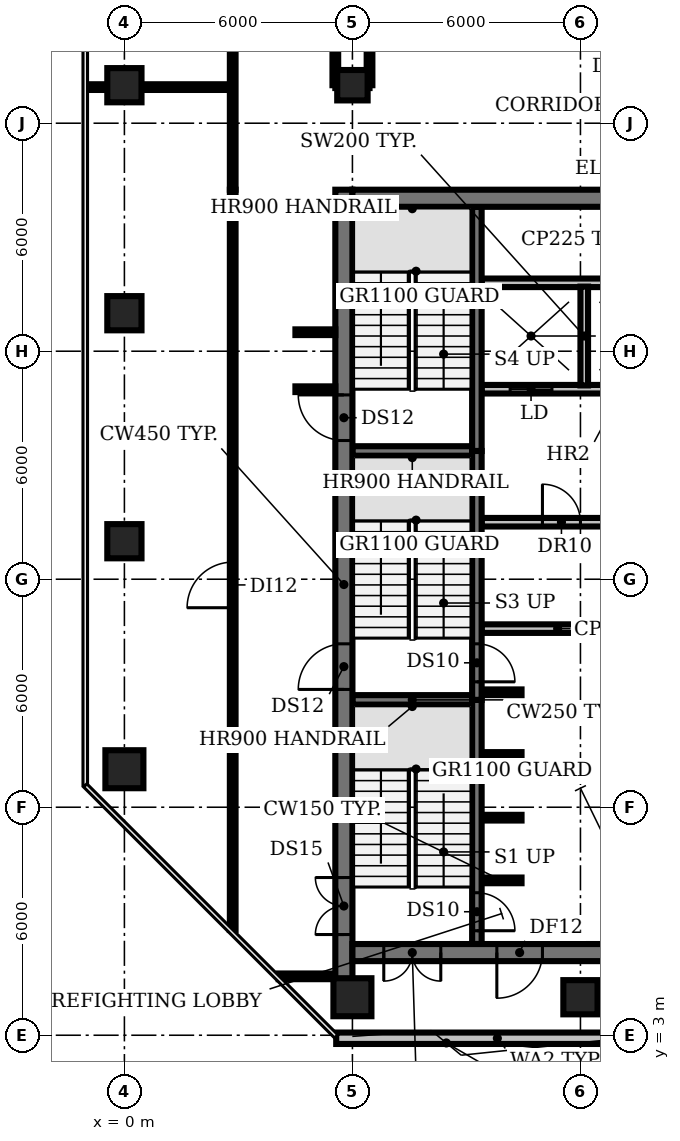
"""IFC4 building model, lengths in metres.
Left out: names, types, materials, properties, quantities, classifications, styles, units other than length and angle.
Written with IfcOpenShell. Run it as: python <this file> out.ifc"""

import sys

from ifc_helpers import new_model, si_unit, direction, frame, frame_2d, origin, origin_2d, place, context, subcontext, project, spatial, rectangle, circle, extrude, element, fill, save


model = new_model("IFC4")
c1 = context("Model", 3, precision=1e-05, world=origin(), true_north=direction((0.0, 1.0)))
c2 = subcontext(c1, "Body", "Model", "MODEL_VIEW")
j1 = project(units=[si_unit("LENGTHUNIT", "METRE"), si_unit("PLANEANGLEUNIT", "RADIAN")], contexts=[c1])
p1 = place(None, origin())
s1 = spatial("IfcSite", under=j1, at=p1, CompositionType="ELEMENT")
p2 = place(p1, origin())
s2 = spatial("IfcBuilding", under=s1, at=p2, CompositionType="ELEMENT")
p3 = place(p2, frame((0.0, 0.0, 205.4)))
s3 = spatial("IfcBuildingStorey", under=s2, at=p3, CompositionType="ELEMENT", Elevation=205.4)
p4 = place(p3, frame((0.0, 10.0, -0.35), z_axis=(0.0, 0.0, 1.0), x_axis=(1.0, 0.0, 0.0)))
e1 = element("IfcColumn", 1, at=p4, inside=s3, PredefinedType="COLUMN", context=c2, shape_type="SweptSolid", body=[
    extrude(circle(Radius=0.5, at=origin_2d()), origin(), (0.0, 0.0, 1.0), 4.2),
])
for number, where, z_axis, x_axis in (
    (2, (0.0, 16.0, -0.35), (0.0, 0.0, 1.0), (1.0, 0.0, 0.0)),
    (3, (0.0, 22.0, -0.35), (0.0, 0.0, 1.0), (1.0, 0.0, 0.0)),
    (4, (0.0, 28.0, -0.35), (0.0, 0.0, 1.0), (1.0, 0.0, 0.0)),
):
    element("IfcColumn", number, at=place(p3, frame(where, z_axis=z_axis, x_axis=x_axis)), inside=s3, PredefinedType="COLUMN", context=c2, shape_type="SweptSolid", body=[
        extrude(rectangle(XDim=0.9, YDim=0.9, at=origin_2d()), origin(), (0.0, 0.0, 1.0), 4.2),
    ])
p5 = place(p3, frame((6.0, 4.0, -0.35), z_axis=(0.0, 0.0, 1.0), x_axis=(1.0, 0.0, 0.0)))
e5 = element("IfcColumn", 5, at=p5, inside=s3, PredefinedType="COLUMN", context=c2, shape_type="SweptSolid", body=[
    extrude(circle(Radius=0.5, at=origin_2d()), origin(), (0.0, 0.0, 1.0), 4.2),
])
p6 = place(p3, frame((6.0, 28.0, -0.35), z_axis=(0.0, 0.0, 1.0), x_axis=(1.0, 0.0, 0.0)))
e6 = element("IfcColumn", 6, at=p6, inside=s3, PredefinedType="COLUMN", context=c2, shape_type="SweptSolid", body=[
    extrude(rectangle(XDim=0.8, YDim=0.8, at=origin_2d()), origin(), (0.0, 0.0, 1.0), 4.2),
])
p7 = place(p3, frame((12.0, 4.0, -0.35), z_axis=(0.0, 0.0, 1.0), x_axis=(1.0, 0.0, 0.0)))
e7 = element("IfcColumn", 7, at=p7, inside=s3, PredefinedType="COLUMN", context=c2, shape_type="SweptSolid", body=[
    extrude(rectangle(XDim=0.9, YDim=0.9, at=origin_2d()), origin(), (0.0, 0.0, 1.0), 4.2),
])
p8 = place(p3, frame((5.573, 2.92, 0.0), z_axis=(0.0, 0.0, 1.0), x_axis=(1.0, 0.0, 0.0)))
e8 = element("IfcWall", 8, at=p8, inside=s3, PredefinedType="SOLIDWALL", context=c2, shape_type="SweptSolid", body=[
    extrude(rectangle(XDim=8.48, YDim=0.3, at=frame_2d((4.24, 0.0))), origin(), (0.0, 0.0, 1.0), 3.85),
])
for number, where, z_axis, x_axis in (
    (9, (9.4, 7.075, 0.0), (0.0, 0.0, 1.0), (1.0, 0.0, 0.0)),
    (10, (9.4, 8.725, 0.0), (0.0, 0.0, 1.0), (1.0, 0.0, 0.0)),
    (11, (9.4, 10.375, 0.0), (0.0, 0.0, 1.0), (1.0, 0.0, 0.0)),
):
    element("IfcWall", number, at=place(p3, frame(where, z_axis=z_axis, x_axis=x_axis)), inside=s3, PredefinedType="SHEAR", context=c2, shape_type="SweptSolid", body=[
        extrude(rectangle(XDim=1.05, YDim=0.15, at=frame_2d((0.525, 0.0))), origin(), (0.0, 0.0, 1.0), 3.85),
    ])
p9 = place(p3, frame((6.0, 11.825, 0.0), z_axis=(0.0, 0.0, 1.0), x_axis=(1.0, 0.0, 0.0)))
e12 = element("IfcWall", 12, at=p9, inside=s3, PredefinedType="SHEAR", context=c2, shape_type="SweptSolid", body=[
    extrude(rectangle(XDim=3.15, YDim=0.25, at=frame_2d((1.575, 0.0))), origin(), (0.0, 0.0, 1.0), 3.85),
])
p10 = place(p3, frame((9.4, 12.025, 0.0), z_axis=(0.0, 0.0, 1.0), x_axis=(1.0, 0.0, 0.0)))
e13 = element("IfcWall", 13, at=p10, inside=s3, PredefinedType="SHEAR", context=c2, shape_type="SweptSolid", body=[
    extrude(rectangle(XDim=1.05, YDim=0.15, at=frame_2d((0.525, 0.0))), origin(), (0.0, 0.0, 1.0), 3.85),
])
p11 = place(p3, frame((9.4, 13.7, 0.0), z_axis=(0.0, 0.0, 1.0), x_axis=(1.0, 0.0, 0.0)))
e14 = element("IfcWall", 14, at=p11, inside=s3, PredefinedType="PARTITIONING", context=c2, shape_type="SweptSolid", body=[
    extrude(rectangle(XDim=4.0, YDim=0.225, at=frame_2d((2.0, 0.0))), origin(), (0.0, 0.0, 1.0), 3.85),
])
p12 = place(p3, frame((9.4, 16.5, 0.0), z_axis=(0.0, 0.0, 1.0), x_axis=(1.0, 0.0, 0.0)))
e15 = element("IfcWall", 15, at=p12, inside=s3, PredefinedType="PARTITIONING", context=c2, shape_type="SweptSolid", body=[
    extrude(rectangle(XDim=14.6, YDim=0.225, at=frame_2d((7.3, 0.0))), origin(), (0.0, 0.0, 1.0), 3.85),
])
p13 = place(p12, frame((1.6, 0.0, 0.0)))
e16 = element("IfcOpeningElement", 16, at=p13, cuts=e15, PredefinedType="OPENING", context=c2, shape_type="SweptSolid", body=[
    extrude(rectangle(XDim=1.0, YDim=2.1, at=frame_2d((0.5, 1.05))), frame((0.0, 0.123, 0.0), z_axis=(0.0, -1.0, 0.0), x_axis=(1.0, 0.0, 0.0)), (0.0, 0.0, 1.0), 0.245),
])
p14 = place(p12, frame((5.125, 0.0, 0.0)))
e17 = element("IfcOpeningElement", 17, at=p14, cuts=e15, PredefinedType="OPENING", context=c2, shape_type="SweptSolid", body=[
    extrude(rectangle(XDim=0.9, YDim=2.1, at=frame_2d((0.45, 1.05))), frame((0.0, 0.123, 0.0), z_axis=(0.0, -1.0, 0.0), x_axis=(1.0, 0.0, 0.0)), (0.0, 0.0, 1.0), 0.245),
])
p15 = place(p12, frame((7.675, 0.0, 0.0)))
e18 = element("IfcOpeningElement", 18, at=p15, cuts=e15, PredefinedType="OPENING", context=c2, shape_type="SweptSolid", body=[
    extrude(rectangle(XDim=0.9, YDim=2.1, at=frame_2d((0.45, 1.05))), frame((0.0, 0.123, 0.0), z_axis=(0.0, -1.0, 0.0), x_axis=(1.0, 0.0, 0.0)), (0.0, 0.0, 1.0), 0.245),
])
p16 = place(p12, frame((9.775, 0.0, 0.0)))
e19 = element("IfcOpeningElement", 19, at=p16, cuts=e15, PredefinedType="OPENING", context=c2, shape_type="SweptSolid", body=[
    extrude(rectangle(XDim=0.9, YDim=2.1, at=frame_2d((0.45, 1.05))), frame((0.0, 0.123, 0.0), z_axis=(0.0, -1.0, 0.0), x_axis=(1.0, 0.0, 0.0)), (0.0, 0.0, 1.0), 0.245),
])
p17 = place(p12, frame((11.647, 0.0, 0.0)))
e20 = element("IfcOpeningElement", 20, at=p17, cuts=e15, PredefinedType="OPENING", context=c2, shape_type="SweptSolid", body=[
    extrude(rectangle(XDim=0.9, YDim=2.1, at=frame_2d((0.45, 1.05))), frame((0.0, 0.123, 0.0), z_axis=(0.0, -1.0, 0.0), x_axis=(1.0, 0.0, 0.0)), (0.0, 0.0, 1.0), 0.245),
])
p18 = place(p12, frame((13.423, 0.0, 0.0)))
e21 = element("IfcOpeningElement", 21, at=p18, cuts=e15, PredefinedType="OPENING", context=c2, shape_type="SweptSolid", body=[
    extrude(rectangle(XDim=0.9, YDim=2.1, at=frame_2d((0.45, 1.05))), frame((0.0, 0.123, 0.0), z_axis=(0.0, -1.0, 0.0), x_axis=(1.0, 0.0, 0.0)), (0.0, 0.0, 1.0), 0.245),
])
p19 = place(p3, frame((6.0, 18.375, 0.0), z_axis=(0.0, 0.0, 1.0), x_axis=(1.0, 0.0, 0.0)))
e22 = element("IfcWall", 22, at=p19, inside=s3, PredefinedType="SHEAR", context=c2, shape_type="SweptSolid", body=[
    extrude(rectangle(XDim=3.15, YDim=0.25, at=frame_2d((1.575, 0.0))), origin(), (0.0, 0.0, 1.0), 3.85),
])
p20 = place(p3, frame((24.0, 20.0, 0.0), z_axis=(0.0, 0.0, 1.0), x_axis=(-1.0, 0.0, 0.0)))
e23 = element("IfcWall", 23, at=p20, inside=s3, PredefinedType="PARTITIONING", context=c2, shape_type="SweptSolid", body=[
    extrude(rectangle(XDim=14.6, YDim=0.225, at=frame_2d((7.3, 0.0))), origin(), (0.0, 0.0, 1.0), 3.85),
])
p21 = place(p20, frame((12.75, 0.0, 0.0)))
e24 = element("IfcOpeningElement", 24, at=p21, cuts=e23, PredefinedType="OPENING", context=c2, shape_type="SweptSolid", body=[
    extrude(rectangle(XDim=1.1, YDim=2.1, at=frame_2d((0.55, 1.05))), frame((0.0, 0.123, 0.0), z_axis=(0.0, -1.0, 0.0), x_axis=(1.0, 0.0, 0.0)), (0.0, 0.0, 1.0), 0.245),
])
p22 = place(p20, frame((9.95, 0.0, 0.0)))
e25 = element("IfcOpeningElement", 25, at=p22, cuts=e23, PredefinedType="OPENING", context=c2, shape_type="SweptSolid", body=[
    extrude(rectangle(XDim=1.1, YDim=2.1, at=frame_2d((0.55, 1.05))), frame((0.0, 0.123, 0.0), z_axis=(0.0, -1.0, 0.0), x_axis=(1.0, 0.0, 0.0)), (0.0, 0.0, 1.0), 0.245),
])
p23 = place(p20, frame((7.15, 0.0, 0.0)))
e26 = element("IfcOpeningElement", 26, at=p23, cuts=e23, PredefinedType="OPENING", context=c2, shape_type="SweptSolid", body=[
    extrude(rectangle(XDim=1.1, YDim=2.1, at=frame_2d((0.55, 1.05))), frame((0.0, 0.123, 0.0), z_axis=(0.0, -1.0, 0.0), x_axis=(1.0, 0.0, 0.0)), (0.0, 0.0, 1.0), 0.245),
])
p24 = place(p20, frame((4.35, 0.0, 0.0)))
e27 = element("IfcOpeningElement", 27, at=p24, cuts=e23, PredefinedType="OPENING", context=c2, shape_type="SweptSolid", body=[
    extrude(rectangle(XDim=1.1, YDim=2.1, at=frame_2d((0.55, 1.05))), frame((0.0, 0.123, 0.0), z_axis=(0.0, -1.0, 0.0), x_axis=(1.0, 0.0, 0.0)), (0.0, 0.0, 1.0), 0.245),
])
p25 = place(p20, frame((2.137, 0.0, 0.0)))
e28 = element("IfcOpeningElement", 28, at=p25, cuts=e23, PredefinedType="OPENING", context=c2, shape_type="SweptSolid", body=[
    extrude(rectangle(XDim=0.9, YDim=2.1, at=frame_2d((0.45, 1.05))), frame((0.0, 0.123, 0.0), z_axis=(0.0, -1.0, 0.0), x_axis=(1.0, 0.0, 0.0)), (0.0, 0.0, 1.0), 0.245),
])
p26 = place(p20, frame((0.363, 0.0, 0.0)))
e29 = element("IfcOpeningElement", 29, at=p26, cuts=e23, PredefinedType="OPENING", context=c2, shape_type="SweptSolid", body=[
    extrude(rectangle(XDim=0.9, YDim=2.1, at=frame_2d((0.45, 1.05))), frame((0.0, 0.123, 0.0), z_axis=(0.0, -1.0, 0.0), x_axis=(1.0, 0.0, 0.0)), (0.0, 0.0, 1.0), 0.245),
])
p27 = place(p3, frame((9.4, 22.8, 0.0), z_axis=(0.0, 0.0, 1.0), x_axis=(1.0, 0.0, 0.0)))
e30 = element("IfcWall", 30, at=p27, inside=s3, PredefinedType="PARTITIONING", context=c2, shape_type="SweptSolid", body=[
    extrude(rectangle(XDim=14.6, YDim=0.225, at=frame_2d((7.3, 0.0))), origin(), (0.0, 0.0, 1.0), 3.85),
])
p28 = place(p3, frame((9.275, 11.825, 0.0), z_axis=(0.0, 0.0, 1.0), x_axis=(0.0, -1.0, 0.0)))
e31 = element("IfcWall", 31, at=p28, inside=s3, PredefinedType="SHEAR", context=c2, shape_type="SweptSolid", body=[
    extrude(rectangle(XDim=6.425, YDim=0.25, at=frame_2d((3.212, 0.0))), origin(), (0.0, 0.0, 1.0), 3.85),
])
p29 = place(p28, frame((5.075, 0.0, 0.0)))
e32 = element("IfcOpeningElement", 32, at=p29, cuts=e31, PredefinedType="OPENING", context=c2, shape_type="SweptSolid", body=[
    extrude(rectangle(XDim=1.0, YDim=2.1, at=frame_2d((0.5, 1.05))), frame((0.0, 0.135, 0.0), z_axis=(0.0, -1.0, 0.0), x_axis=(1.0, 0.0, 0.0)), (0.0, 0.0, 1.0), 0.27),
])
p30 = place(p3, frame((9.275, 18.375, 0.0), z_axis=(0.0, 0.0, 1.0), x_axis=(0.0, -1.0, 0.0)))
e33 = element("IfcWall", 33, at=p30, inside=s3, PredefinedType="SHEAR", context=c2, shape_type="SweptSolid", body=[
    extrude(rectangle(XDim=6.55, YDim=0.25, at=frame_2d((3.275, 0.0))), origin(), (0.0, 0.0, 1.0), 3.85),
])
p31 = place(p30, frame((5.075, 0.0, 0.0)))
e34 = element("IfcOpeningElement", 34, at=p31, cuts=e33, PredefinedType="OPENING", context=c2, shape_type="SweptSolid", body=[
    extrude(rectangle(XDim=1.0, YDim=2.1, at=frame_2d((0.5, 1.05))), frame((0.0, 0.135, 0.0), z_axis=(0.0, -1.0, 0.0), x_axis=(1.0, 0.0, 0.0)), (0.0, 0.0, 1.0), 0.27),
])
p32 = place(p3, frame((9.275, 18.375, 0.0), z_axis=(0.0, 0.0, 1.0), x_axis=(0.0, 1.0, 0.0)))
e35 = element("IfcWall", 35, at=p32, inside=s3, PredefinedType="SHEAR", context=c2, shape_type="SweptSolid", body=[
    extrude(rectangle(XDim=6.425, YDim=0.25, at=frame_2d((3.212, 0.0))), origin(), (0.0, 0.0, 1.0), 3.85),
])
p33 = place(p3, frame((12.1, 20.1, 0.0), z_axis=(0.0, 0.0, 1.0), x_axis=(0.0, 1.0, 0.0)))
e36 = element("IfcWall", 36, at=p33, inside=s3, PredefinedType="SOLIDWALL", context=c2, shape_type="SweptSolid", body=[
    extrude(rectangle(XDim=2.6, YDim=0.2, at=frame_2d((1.3, 0.0))), origin(), (0.0, 0.0, 1.0), 3.85),
])
p34 = place(p3, frame((5.775, 4.47, 0.0), z_axis=(0.0, 0.0, 1.0), x_axis=(0.0, 1.0, 0.0)))
e37 = element("IfcWall", 37, at=p34, inside=s3, PredefinedType="SHEAR", context=c2, shape_type="SweptSolid", body=[
    extrude(rectangle(XDim=20.78, YDim=0.45, at=frame_2d((10.39, 0.0))), origin(), (0.0, 0.0, 1.0), 3.85),
])
p35 = place(p34, frame((1.18, 0.0, 0.0)))
e38 = element("IfcOpeningElement", 38, at=p35, cuts=e37, PredefinedType="OPENING", context=c2, shape_type="SweptSolid", body=[
    extrude(rectangle(XDim=1.5, YDim=2.1, at=frame_2d((0.75, 1.05))), frame((0.0, 0.235, 0.0), z_axis=(0.0, -1.0, 0.0), x_axis=(1.0, 0.0, 0.0)), (0.0, 0.0, 1.0), 0.47),
])
p36 = place(p34, frame((7.63, 0.0, 0.0)))
e39 = element("IfcOpeningElement", 39, at=p36, cuts=e37, PredefinedType="OPENING", context=c2, shape_type="SweptSolid", body=[
    extrude(rectangle(XDim=1.2, YDim=2.1, at=frame_2d((0.6, 1.05))), frame((0.0, 0.235, 0.0), z_axis=(0.0, -1.0, 0.0), x_axis=(1.0, 0.0, 0.0)), (0.0, 0.0, 1.0), 0.47),
])
p37 = place(p34, frame((14.18, 0.0, 0.0)))
e40 = element("IfcOpeningElement", 40, at=p37, cuts=e37, PredefinedType="OPENING", context=c2, shape_type="SweptSolid", body=[
    extrude(rectangle(XDim=1.2, YDim=2.1, at=frame_2d((0.6, 1.05))), frame((0.0, 0.235, 0.0), z_axis=(0.0, -1.0, 0.0), x_axis=(1.0, 0.0, 0.0)), (0.0, 0.0, 1.0), 0.47),
])
p38 = place(p3, frame((24.0, 5.175, 0.0), z_axis=(0.0, 0.0, 1.0), x_axis=(-1.0, 0.0, 0.0)))
e41 = element("IfcWall", 41, at=p38, inside=s3, PredefinedType="SHEAR", context=c2, shape_type="SweptSolid", body=[
    extrude(rectangle(XDim=18.0, YDim=0.45, at=frame_2d((9.0, 0.0))), origin(), (0.0, 0.0, 1.0), 3.85),
])
p39 = place(p38, frame((0.825, 0.0, 0.0)))
e42 = element("IfcOpeningElement", 42, at=p39, cuts=e41, PredefinedType="OPENING", context=c2, shape_type="SweptSolid", body=[
    extrude(rectangle(XDim=1.5, YDim=2.1, at=frame_2d((0.75, 1.05))), frame((0.0, 0.235, 0.0), z_axis=(0.0, -1.0, 0.0), x_axis=(1.0, 0.0, 0.0)), (0.0, 0.0, 1.0), 0.47),
])
p40 = place(p38, frame((15.675, 0.0, 0.0)))
e43 = element("IfcOpeningElement", 43, at=p40, cuts=e41, PredefinedType="OPENING", context=c2, shape_type="SweptSolid", body=[
    extrude(rectangle(XDim=1.5, YDim=2.1, at=frame_2d((0.75, 1.05))), frame((0.0, 0.235, 0.0), z_axis=(0.0, -1.0, 0.0), x_axis=(1.0, 0.0, 0.0)), (0.0, 0.0, 1.0), 0.47),
])
p41 = place(p38, frame((13.0, 0.0, 0.0)))
e44 = element("IfcOpeningElement", 44, at=p41, cuts=e41, PredefinedType="OPENING", context=c2, shape_type="SweptSolid", body=[
    extrude(rectangle(XDim=1.2, YDim=2.1, at=frame_2d((0.6, 1.05))), frame((0.0, 0.235, 0.0), z_axis=(0.0, -1.0, 0.0), x_axis=(1.0, 0.0, 0.0)), (0.0, 0.0, 1.0), 0.47),
])
p42 = place(p38, frame((4.35, 0.0, 0.0)))
e45 = element("IfcOpeningElement", 45, at=p42, cuts=e41, PredefinedType="OPENING", context=c2, shape_type="SweptSolid", body=[
    extrude(rectangle(XDim=1.0, YDim=2.1, at=frame_2d((0.5, 1.05))), frame((0.0, 0.235, 0.0), z_axis=(0.0, -1.0, 0.0), x_axis=(1.0, 0.0, 0.0)), (0.0, 0.0, 1.0), 0.47),
])
p43 = place(p3, frame((6.0, 25.025, 0.0), z_axis=(0.0, 0.0, 1.0), x_axis=(1.0, 0.0, 0.0)))
e46 = element("IfcWall", 46, at=p43, inside=s3, PredefinedType="SHEAR", context=c2, shape_type="SweptSolid", body=[
    extrude(rectangle(XDim=18.0, YDim=0.45, at=frame_2d((9.0, 0.0))), origin(), (0.0, 0.0, 1.0), 3.85),
])
p44 = place(p3, frame((-0.98, 27.95, 0.0), z_axis=(0.0, 0.0, 1.0), x_axis=(1.0, 0.0, 0.0)))
e47 = element("IfcWall", 47, at=p44, inside=s3, PredefinedType="PARTITIONING", context=c2, shape_type="SweptSolid", body=[
    extrude(rectangle(XDim=3.83, YDim=0.15, at=frame_2d((1.915, 0.0))), origin(), (0.0, 0.0, 1.0), 2.88),
])
p45 = place(p3, frame((2.85, 5.77, 0.0), z_axis=(0.0, 0.0, 1.0), x_axis=(0.0, 1.0, 0.0)))
e48 = element("IfcWall", 48, at=p45, inside=s3, PredefinedType="PARTITIONING", context=c2, shape_type="SweptSolid", body=[
    extrude(rectangle(XDim=19.48, YDim=0.15, at=frame_2d((9.74, 0.0))), origin(), (0.0, 0.0, 1.0), 2.88),
])
p46 = place(p45, frame((8.48, 0.0, 0.0)))
e49 = element("IfcOpeningElement", 49, at=p46, cuts=e48, PredefinedType="OPENING", context=c2, shape_type="SweptSolid", body=[
    extrude(rectangle(XDim=1.2, YDim=2.1, at=frame_2d((0.6, 1.05))), frame((0.0, 0.085, 0.0), z_axis=(0.0, -1.0, 0.0), x_axis=(1.0, 0.0, 0.0)), (0.0, 0.0, 1.0), 0.17),
])
p47 = place(p3, frame((2.85, 25.25, 0.0), z_axis=(0.0, 0.0, 1.0), x_axis=(0.0, 1.0, 0.0)))
e50 = element("IfcWall", 50, at=p47, inside=s3, PredefinedType="PARTITIONING", context=c2, shape_type="SweptSolid", body=[
    extrude(rectangle(XDim=3.9, YDim=0.15, at=frame_2d((1.95, 0.0))), origin(), (0.0, 0.0, 1.0), 2.88),
])
p48 = place(p3, frame((4.06, 4.55, 0.0), z_axis=(0.0, 0.0, 1.0), x_axis=(1.0, 0.0, 0.0)))
e51 = element("IfcWall", 51, at=p48, inside=s3, PredefinedType="PARTITIONING", context=c2, shape_type="SweptSolid", body=[
    extrude(rectangle(XDim=1.39, YDim=0.15, at=frame_2d((0.695, 0.0))), origin(), (0.0, 0.0, 1.0), 2.88),
])
for number, where, z_axis, x_axis in (
    (52, (4.5, 20.0, 0.0), (0.0, 0.0, 1.0), (1.0, 0.0, 0.0)),
    (53, (4.5, 21.5, 0.0), (0.0, 0.0, 1.0), (1.0, 0.0, 0.0)),
):
    element("IfcWall", number, at=place(p3, frame(where, z_axis=z_axis, x_axis=x_axis)), inside=s3, PredefinedType="PARTITIONING", context=c2, shape_type="SweptSolid", body=[
        extrude(rectangle(XDim=1.05, YDim=0.15, at=frame_2d((0.525, 0.0))), origin(), (0.0, 0.0, 1.0), 2.88),
    ])
p49 = place(p3, frame((5.55, 28.0, 0.0), z_axis=(0.0, 0.0, 1.0), x_axis=(0.0, 1.0, 0.0)))
e54 = element("IfcWall", 54, at=p49, inside=s3, PredefinedType="PARTITIONING", context=c2, shape_type="SweptSolid", body=[
    extrude(rectangle(XDim=1.15, YDim=0.15, at=frame_2d((0.575, 0.0))), origin(), (0.0, 0.0, 1.0), 2.88),
])
p50 = place(p3, frame((5.55, 28.0, 0.0), z_axis=(0.0, 0.0, 1.0), x_axis=(1.0, 0.0, 0.0)))
e55 = element("IfcWall", 55, at=p50, inside=s3, PredefinedType="PARTITIONING", context=c2, shape_type="SweptSolid", body=[
    extrude(rectangle(XDim=0.9, YDim=0.15, at=frame_2d((0.45, 0.0))), origin(), (0.0, 0.0, 1.0), 2.88),
])
p51 = place(p3, frame((6.45, 28.0, 0.0), z_axis=(0.0, 0.0, 1.0), x_axis=(0.0, 1.0, 0.0)))
e56 = element("IfcWall", 56, at=p51, inside=s3, PredefinedType="PARTITIONING", context=c2, shape_type="SweptSolid", body=[
    extrude(rectangle(XDim=1.15, YDim=0.15, at=frame_2d((0.575, 0.0))), origin(), (0.0, 0.0, 1.0), 2.88),
])
p52 = place(p13, origin())
e57 = element("IfcDoor", 57, at=p52, inside=s3, OperationType="SINGLE_SWING_LEFT", PredefinedType="DOOR", context=c2, shape_type="SweptSolid", body=[
    extrude(rectangle(XDim=1.0, YDim=2.1, at=frame_2d((0.5, 1.05))), frame((0.0, 0.025, 0.0), z_axis=(0.0, -1.0, 0.0), x_axis=(1.0, 0.0, 0.0)), (0.0, 0.0, 1.0), 0.05),
])
fill(e16, e57)
p53 = place(p21, origin())
e58 = element("IfcDoor", 58, at=p53, inside=s3, OperationType="DOUBLE_DOOR_SLIDING", PredefinedType="DOOR", context=c2, shape_type="SweptSolid", body=[
    extrude(rectangle(XDim=1.1, YDim=2.1, at=frame_2d((0.55, 1.05))), frame((0.0, 0.025, 0.0), z_axis=(0.0, -1.0, 0.0), x_axis=(1.0, 0.0, 0.0)), (0.0, 0.0, 1.0), 0.05),
])
fill(e24, e58)
p54 = place(p29, origin())
e59 = element("IfcDoor", 59, at=p54, inside=s3, OperationType="SINGLE_SWING_RIGHT", PredefinedType="DOOR", context=c2, shape_type="SweptSolid", body=[
    extrude(rectangle(XDim=1.0, YDim=2.1, at=frame_2d((0.5, 1.05))), frame((0.0, 0.025, 0.0), z_axis=(0.0, -1.0, 0.0), x_axis=(1.0, 0.0, 0.0)), (0.0, 0.0, 1.0), 0.05),
])
fill(e32, e59)
p55 = place(p31, origin())
e60 = element("IfcDoor", 60, at=p55, inside=s3, OperationType="SINGLE_SWING_RIGHT", PredefinedType="DOOR", context=c2, shape_type="SweptSolid", body=[
    extrude(rectangle(XDim=1.0, YDim=2.1, at=frame_2d((0.5, 1.05))), frame((0.0, 0.025, 0.0), z_axis=(0.0, -1.0, 0.0), x_axis=(1.0, 0.0, 0.0)), (0.0, 0.0, 1.0), 0.05),
])
fill(e34, e60)
p56 = place(p35, origin())
e61 = element("IfcDoor", 61, at=p56, inside=s3, OperationType="DOUBLE_DOOR_SINGLE_SWING", PredefinedType="DOOR", context=c2, shape_type="SweptSolid", body=[
    extrude(rectangle(XDim=1.5, YDim=2.1, at=frame_2d((0.75, 1.05))), frame((0.0, 0.025, 0.0), z_axis=(0.0, -1.0, 0.0), x_axis=(1.0, 0.0, 0.0)), (0.0, 0.0, 1.0), 0.05),
])
fill(e38, e61)
p57 = place(p36, origin())
e62 = element("IfcDoor", 62, at=p57, inside=s3, OperationType="SINGLE_SWING_LEFT", PredefinedType="DOOR", context=c2, shape_type="SweptSolid", body=[
    extrude(rectangle(XDim=1.2, YDim=2.1, at=frame_2d((0.6, 1.05))), frame((0.0, 0.025, 0.0), z_axis=(0.0, -1.0, 0.0), x_axis=(1.0, 0.0, 0.0)), (0.0, 0.0, 1.0), 0.05),
])
fill(e39, e62)
p58 = place(p37, origin())
e63 = element("IfcDoor", 63, at=p58, inside=s3, OperationType="SINGLE_SWING_RIGHT", PredefinedType="DOOR", context=c2, shape_type="SweptSolid", body=[
    extrude(rectangle(XDim=1.2, YDim=2.1, at=frame_2d((0.6, 1.05))), frame((0.0, 0.025, 0.0), z_axis=(0.0, -1.0, 0.0), x_axis=(1.0, 0.0, 0.0)), (0.0, 0.0, 1.0), 0.05),
])
fill(e40, e63)
p59 = place(p40, origin())
e64 = element("IfcDoor", 64, at=p59, inside=s3, OperationType="DOUBLE_DOOR_SINGLE_SWING", PredefinedType="DOOR", context=c2, shape_type="SweptSolid", body=[
    extrude(rectangle(XDim=1.5, YDim=2.1, at=frame_2d((0.75, 1.05))), frame((0.0, 0.025, 0.0), z_axis=(0.0, -1.0, 0.0), x_axis=(1.0, 0.0, 0.0)), (0.0, 0.0, 1.0), 0.05),
])
fill(e43, e64)
p60 = place(p41, origin())
e65 = element("IfcDoor", 65, at=p60, inside=s3, OperationType="SINGLE_SWING_RIGHT", PredefinedType="DOOR", context=c2, shape_type="SweptSolid", body=[
    extrude(rectangle(XDim=1.2, YDim=2.1, at=frame_2d((0.6, 1.05))), frame((0.0, 0.025, 0.0), z_axis=(0.0, -1.0, 0.0), x_axis=(1.0, 0.0, 0.0)), (0.0, 0.0, 1.0), 0.05),
])
fill(e44, e65)
p61 = place(p46, origin())
e66 = element("IfcDoor", 66, at=p61, inside=s3, OperationType="SINGLE_SWING_LEFT", PredefinedType="DOOR", context=c2, shape_type="SweptSolid", body=[
    extrude(rectangle(XDim=1.2, YDim=2.1, at=frame_2d((0.6, 1.05))), frame((0.0, 0.025, 0.0), z_axis=(0.0, -1.0, 0.0), x_axis=(1.0, 0.0, 0.0)), (0.0, 0.0, 1.0), 0.05),
])
fill(e49, e66)
save(model, sys.argv[1])
